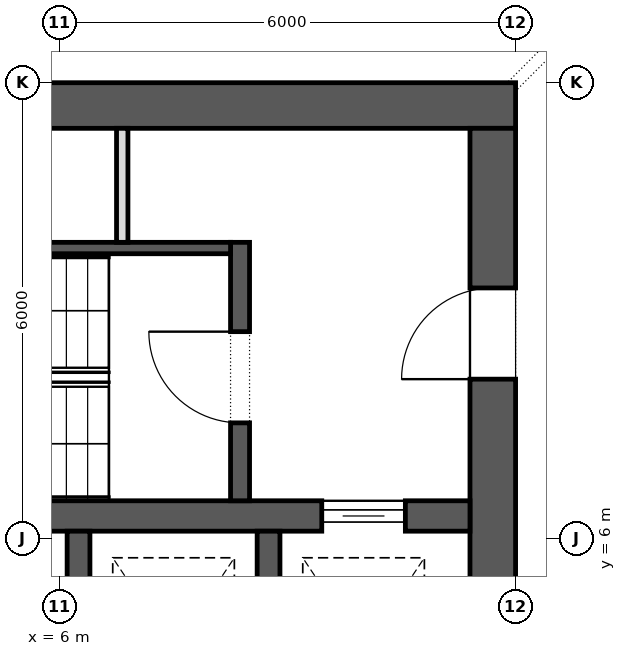
"""IFC4 building model, lengths in metres.
Left out: names, types, materials, properties, quantities, classifications, styles, units other than length and angle.
Written with IfcOpenShell. Run it as: python <this file> out.ifc"""

import sys

from ifc_helpers import new_model, si_unit, direction, frame, frame_2d, origin, place, context, subcontext, project, spatial, rectangle, extrude, element, fill, save


model = new_model("IFC4")
c1 = context("Model", 3, precision=1e-05, world=origin(), true_north=direction((0.0, 1.0)))
c2 = subcontext(c1, "Body", "Model", "MODEL_VIEW")
j1 = project(units=[si_unit("LENGTHUNIT", "METRE"), si_unit("PLANEANGLEUNIT", "RADIAN")], contexts=[c1])
p1 = place(None, origin())
s1 = spatial("IfcSite", under=j1, at=p1, CompositionType="ELEMENT")
p2 = place(p1, origin())
s2 = spatial("IfcBuilding", under=s1, at=p2, CompositionType="ELEMENT")
p3 = place(p2, frame((0.0, 0.0, -4.0)))
s3 = spatial("IfcBuildingStorey", under=s2, at=p3, CompositionType="ELEMENT", Elevation=-4.0)
p4 = place(p3, frame((-12.0, 11.7, 0.0), z_axis=(0.0, 0.0, 1.0), x_axis=(1.0, 0.0, 0.0)))
e1 = element("IfcWall", 1, at=p4, inside=s3, PredefinedType="SHEAR", context=c2, shape_type="SweptSolid", body=[
    extrude(rectangle(XDim=24.0, YDim=0.6, at=frame_2d((12.0, 0.0))), origin(), (0.0, 0.0, 1.0), 4.0),
])
p5 = place(p4, frame((10.025, 0.0, 0.0)))
e2 = element("IfcOpeningElement", 2, at=p5, cuts=e1, PredefinedType="OPENING", context=c2, shape_type="SweptSolid", body=[
    extrude(rectangle(XDim=0.8, YDim=2.1, at=frame_2d((0.4, 1.05))), frame((0.0, 0.312, 0.0), z_axis=(0.0, -1.0, 0.0), x_axis=(1.0, 0.0, 0.0)), (0.0, 0.0, 1.0), 0.624),
])
p6 = place(p3, frame((11.7, -11.4, 0.0), z_axis=(0.0, 0.0, 1.0), x_axis=(0.0, 1.0, 0.0)))
e3 = element("IfcWall", 3, at=p6, inside=s3, PredefinedType="SHEAR", context=c2, shape_type="SweptSolid", body=[
    extrude(rectangle(XDim=22.8, YDim=0.6, at=frame_2d((11.4, 0.0))), origin(), (0.0, 0.0, 1.0), 4.0),
])
p7 = place(p6, frame((10.2, 0.0, 0.0)))
e4 = element("IfcOpeningElement", 4, at=p7, cuts=e3, PredefinedType="OPENING", context=c2, shape_type="SweptSolid", body=[
    extrude(rectangle(XDim=2.4, YDim=2.1, at=frame_2d((1.2, 1.05))), frame((0.0, 0.312, 0.0), z_axis=(0.0, -1.0, 0.0), x_axis=(1.0, 0.0, 0.0)), (0.0, 0.0, 1.0), 0.624),
])
p8 = place(p6, frame((19.5, 0.0, 0.0)))
e5 = element("IfcOpeningElement", 5, at=p8, cuts=e3, PredefinedType="OPENING", context=c2, shape_type="SweptSolid", body=[
    extrude(rectangle(XDim=1.2, YDim=2.1, at=frame_2d((0.6, 1.05))), frame((0.0, 0.312, 0.0), z_axis=(0.0, -1.0, 0.0), x_axis=(1.0, 0.0, 0.0)), (0.0, 0.0, 1.0), 0.624),
])
p9 = place(p6, frame((2.1, 0.0, 0.0)))
e6 = element("IfcOpeningElement", 6, at=p9, cuts=e3, PredefinedType="OPENING", context=c2, shape_type="SweptSolid", body=[
    extrude(rectangle(XDim=1.2, YDim=2.1, at=frame_2d((0.6, 1.05))), frame((0.0, 0.312, 0.0), z_axis=(0.0, -1.0, 0.0), x_axis=(1.0, 0.0, 0.0)), (0.0, 0.0, 1.0), 0.624),
])
p10 = place(p3, frame((-11.4, 6.3, 0.0), z_axis=(0.0, 0.0, 1.0), x_axis=(1.0, 0.0, 0.0)))
e7 = element("IfcWall", 7, at=p10, inside=s3, PredefinedType="SHEAR", context=c2, shape_type="SweptSolid", body=[
    extrude(rectangle(XDim=22.8, YDim=0.4, at=frame_2d((11.4, 0.0))), origin(), (0.0, 0.0, 1.0), 4.0),
])
p11 = place(p10, frame((20.85, 0.0, 0.0)))
e8 = element("IfcOpeningElement", 8, at=p11, cuts=e7, PredefinedType="OPENING", context=c2, shape_type="SweptSolid", body=[
    extrude(rectangle(XDim=1.1, YDim=2.1, at=frame_2d((0.55, 1.05))), frame((0.0, 0.212, 0.0), z_axis=(0.0, -1.0, 0.0), x_axis=(1.0, 0.0, 0.0)), (0.0, 0.0, 1.0), 0.424),
])
for number, where, z_axis, x_axis in (
    (9, (6.25, 3.2, 0.0), (0.0, 0.0, 1.0), (0.0, 1.0, 0.0)),
    (10, (8.75, 3.2, 0.0), (0.0, 0.0, 1.0), (0.0, 1.0, 0.0)),
):
    element("IfcWall", number, at=place(p3, frame(where, z_axis=z_axis, x_axis=x_axis)), inside=s3, PredefinedType="SHEAR", context=c2, shape_type="SweptSolid", body=[
        extrude(rectangle(XDim=2.9, YDim=0.3, at=frame_2d((1.45, 0.0))), origin(), (0.0, 0.0, 1.0), 4.0),
    ])
p12 = place(p3, frame((8.375, 6.5, 0.0), z_axis=(0.0, 0.0, 1.0), x_axis=(0.0, 1.0, 0.0)))
e11 = element("IfcWall", 11, at=p12, inside=s3, PredefinedType="SHEAR", context=c2, shape_type="SweptSolid", body=[
    extrude(rectangle(XDim=3.4, YDim=0.25, at=frame_2d((1.7, 0.0))), origin(), (0.0, 0.0, 1.0), 3.55),
])
p13 = place(p12, frame((1.025, 0.0, 0.0)))
e12 = element("IfcOpeningElement", 12, at=p13, cuts=e11, PredefinedType="OPENING", context=c2, shape_type="SweptSolid", body=[
    extrude(rectangle(XDim=1.2, YDim=2.1, at=frame_2d((0.6, 1.05))), frame((0.0, 0.137, 0.0), z_axis=(0.0, -1.0, 0.0), x_axis=(1.0, 0.0, 0.0)), (0.0, 0.0, 1.0), 0.274),
])
p14 = place(p3, frame((0.25, 9.825, 0.0), z_axis=(0.0, 0.0, 1.0), x_axis=(1.0, 0.0, 0.0)))
e13 = element("IfcWall", 13, at=p14, inside=s3, PredefinedType="SHEAR", context=c2, shape_type="SweptSolid", body=[
    extrude(rectangle(XDim=8.0, YDim=0.15, at=frame_2d((4.0, 0.0))), origin(), (0.0, 0.0, 1.0), 3.55),
])
p15 = place(p3, frame((6.825, 9.9, 0.0), z_axis=(0.0, 0.0, 1.0), x_axis=(0.0, 1.0, 0.0)))
e14 = element("IfcWall", 14, at=p15, inside=s3, PredefinedType="PARTITIONING", context=c2, shape_type="SweptSolid", body=[
    extrude(rectangle(XDim=1.5, YDim=0.15, at=frame_2d((0.75, 0.0))), origin(), (0.0, 0.0, 1.0), 3.55),
])
p16 = place(p11, origin())
e15 = element("IfcDoor", 15, at=p16, inside=s3, OperationType="SLIDING_TO_LEFT", PredefinedType="DOOR", context=c2, shape_type="SweptSolid", body=[
    extrude(rectangle(XDim=1.1, YDim=2.1, at=frame_2d((0.55, 1.05))), frame((0.0, 0.025, 0.0), z_axis=(0.0, -1.0, 0.0), x_axis=(1.0, 0.0, 0.0)), (0.0, 0.0, 1.0), 0.05),
])
fill(e8, e15)
p17 = place(p13, origin())
e16 = element("IfcDoor", 16, at=p17, inside=s3, OperationType="SINGLE_SWING_LEFT", PredefinedType="DOOR", context=c2, shape_type="SweptSolid", body=[
    extrude(rectangle(XDim=1.2, YDim=2.1, at=frame_2d((0.6, 1.05))), frame((0.0, 0.025, 0.0), z_axis=(0.0, -1.0, 0.0), x_axis=(1.0, 0.0, 0.0)), (0.0, 0.0, 1.0), 0.05),
])
fill(e12, e16)
p18 = place(p8, origin())
e17 = element("IfcDoor", 17, at=p18, inside=s3, OperationType="SINGLE_SWING_RIGHT", PredefinedType="DOOR", context=c2, shape_type="SweptSolid", body=[
    extrude(rectangle(XDim=1.2, YDim=2.1, at=frame_2d((0.6, 1.05))), frame((0.0, 0.025, 0.0), z_axis=(0.0, -1.0, 0.0), x_axis=(1.0, 0.0, 0.0)), (0.0, 0.0, 1.0), 0.05),
])
fill(e5, e17)
save(model, sys.argv[1])
